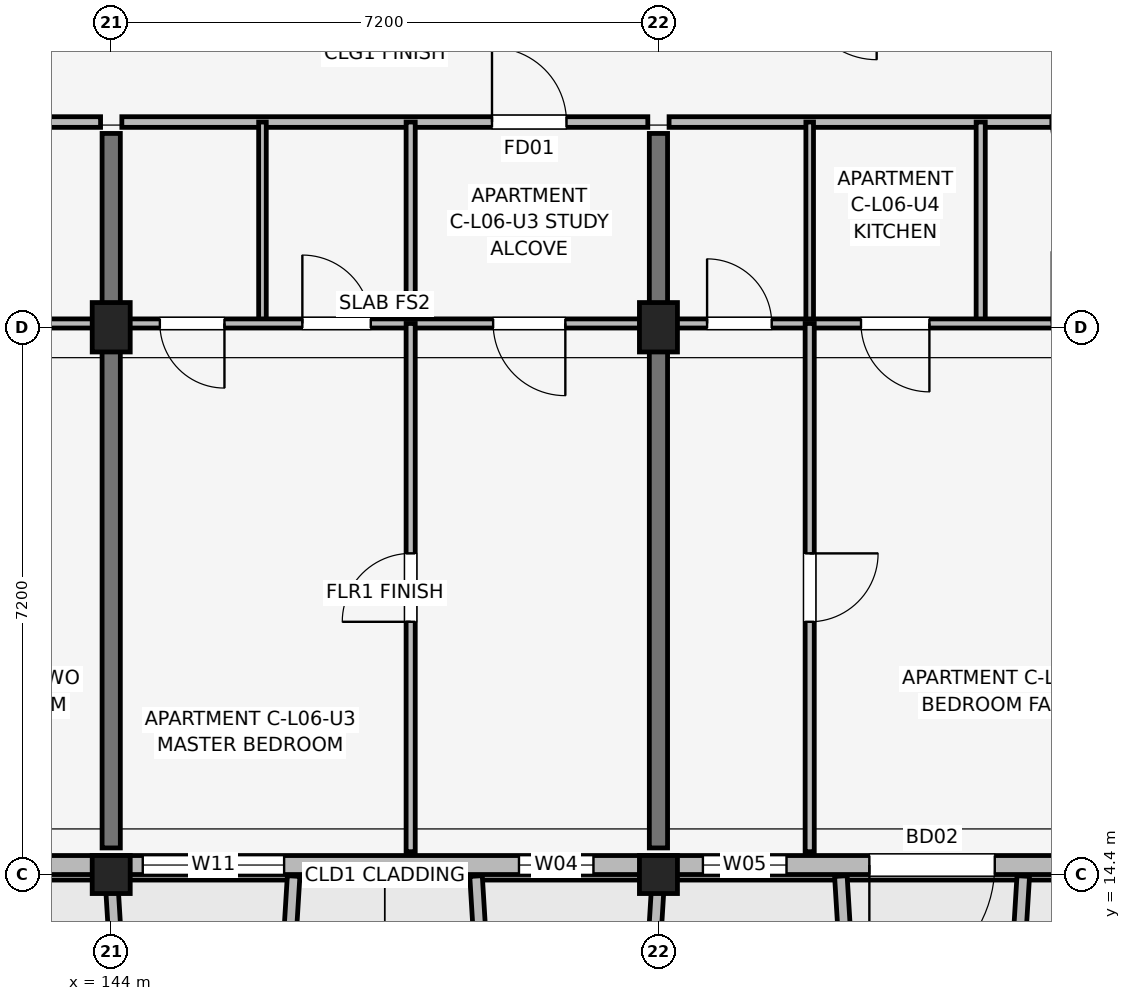
"""IFC4 building model, lengths in metres.
Left out: names, types, materials, properties, quantities, classifications, styles, units other than length and angle.
Written with IfcOpenShell. Run it as: python <this file> out.ifc"""

import sys

from ifc_helpers import new_model, si_unit, direction, frame, frame_2d, origin, origin_2d, place, context, subcontext, project, spatial, rectangle, extrude, element, fill, save


model = new_model("IFC4")
c1 = context("Model", 3, precision=1e-05, world=origin(), true_north=direction((0.0, 1.0)))
c2 = subcontext(c1, "Body", "Model", "MODEL_VIEW")
j1 = project(units=[si_unit("LENGTHUNIT", "METRE"), si_unit("PLANEANGLEUNIT", "RADIAN")], contexts=[c1])
p1 = place(None, origin())
s1 = spatial("IfcSite", under=j1, at=p1, CompositionType="ELEMENT")
p2 = place(p1, origin())
s2 = spatial("IfcBuilding", under=s1, at=p2, CompositionType="ELEMENT")
p3 = place(p2, frame((0.0, 0.0, 21.3)))
s3 = spatial("IfcBuildingStorey", under=s2, at=p3, CompositionType="ELEMENT", Elevation=21.3)
p4 = place(p3, frame((144.0, 14.4, 0.0), z_axis=(0.0, 0.0, 1.0), x_axis=(1.0, 0.0, 0.0)))
e1 = element("IfcColumn", 1, at=p4, inside=s3, PredefinedType="COLUMN", context=c2, shape_type="SweptSolid", body=[
    extrude(rectangle(XDim=0.5, YDim=0.5, at=origin_2d()), origin(), (0.0, 0.0, 1.0), 3.15),
])
p5 = place(p3, frame((144.0, 21.6, 0.0), z_axis=(0.0, 0.0, 1.0), x_axis=(1.0, 0.0, 0.0)))
e2 = element("IfcColumn", 2, at=p5, inside=s3, PredefinedType="COLUMN", context=c2, shape_type="SweptSolid", body=[
    extrude(rectangle(XDim=0.5, YDim=0.65, at=origin_2d()), origin(), (0.0, 0.0, 1.0), 3.15),
])
p6 = place(p3, frame((151.2, 14.4, 0.0), z_axis=(0.0, 0.0, 1.0), x_axis=(1.0, 0.0, 0.0)))
e3 = element("IfcColumn", 3, at=p6, inside=s3, PredefinedType="COLUMN", context=c2, shape_type="SweptSolid", body=[
    extrude(rectangle(XDim=0.5, YDim=0.5, at=origin_2d()), origin(), (0.0, 0.0, 1.0), 3.15),
])
p7 = place(p3, frame((151.2, 21.6, 0.0), z_axis=(0.0, 0.0, 1.0), x_axis=(1.0, 0.0, 0.0)))
e4 = element("IfcColumn", 4, at=p7, inside=s3, PredefinedType="COLUMN", context=c2, shape_type="SweptSolid", body=[
    extrude(rectangle(XDim=0.5, YDim=0.65, at=origin_2d()), origin(), (0.0, 0.0, 1.0), 3.15),
])
for number, where, z_axis, x_axis in (
    (5, (144.0, 14.75, 0.0), (0.0, 0.0, 1.0), (0.0, 1.0, 0.0)),
    (6, (151.2, 14.75, 0.0), (0.0, 0.0, 1.0), (0.0, 1.0, 0.0)),
):
    element("IfcWall", number, at=place(p3, frame(where, z_axis=z_axis, x_axis=x_axis)), inside=s3, PredefinedType="SHEAR", context=c2, shape_type="SweptSolid", body=[
        extrude(rectangle(XDim=9.4, YDim=0.24, at=frame_2d((4.7, 0.0))), origin(), (0.0, 0.0, 1.0), 3.15),
    ])
p8 = place(p3, frame((132.6, 14.525, 0.0), z_axis=(0.0, 0.0, 1.0), x_axis=(1.0, 0.0, 0.0)))
e7 = element("IfcWall", 7, at=p8, inside=s3, PredefinedType="SOLIDWALL", context=c2, shape_type="SweptSolid", body=[
    extrude(rectangle(XDim=30.0, YDim=0.25, at=frame_2d((15.0, 0.0))), origin(), (0.0, 0.0, 1.0), 2.43),
])
p9 = place(p8, frame((8.7, 0.0, 0.0), z_axis=(0.0, 0.0, 1.0), x_axis=(-1.0, 0.0, 0.0)))
e8 = element("IfcOpeningElement", 8, at=p9, cuts=e7, PredefinedType="OPENING", context=c2, shape_type="SweptSolid", body=[
    extrude(rectangle(XDim=1.8, YDim=2.15, at=frame_2d((0.9, 1.075))), frame((0.0, 0.135, 0.0), z_axis=(0.0, -1.0, 0.0), x_axis=(1.0, 0.0, 0.0)), (0.0, 0.0, 1.0), 0.27),
])
p10 = place(p8, frame((23.025, 0.0, 0.0), z_axis=(0.0, 0.0, 1.0), x_axis=(-1.0, 0.0, 0.0)))
e9 = element("IfcOpeningElement", 9, at=p10, cuts=e7, PredefinedType="OPENING", context=c2, shape_type="SweptSolid", body=[
    extrude(rectangle(XDim=1.65, YDim=2.15, at=frame_2d((0.825, 1.075))), frame((0.0, 0.135, 0.0), z_axis=(0.0, -1.0, 0.0), x_axis=(1.0, 0.0, 0.0)), (0.0, 0.0, 1.0), 0.27),
])
p11 = place(p8, frame((1.995, 0.0, 0.7)))
e10 = element("IfcOpeningElement", 10, at=p11, cuts=e7, PredefinedType="OPENING", context=c2, shape_type="SweptSolid", body=[
    extrude(rectangle(XDim=1.72, YDim=1.6, at=frame_2d((0.86, 0.8))), frame((0.0, 0.135, 0.0), z_axis=(0.0, -1.0, 0.0), x_axis=(1.0, 0.0, 0.0)), (0.0, 0.0, 1.0), 0.27),
])
p12 = place(p8, frame((4.975, 0.0, 0.75)))
e11 = element("IfcOpeningElement", 11, at=p12, cuts=e7, PredefinedType="OPENING", context=c2, shape_type="SweptSolid", body=[
    extrude(rectangle(XDim=0.72, YDim=1.35, at=frame_2d((0.36, 0.675))), frame((0.0, 0.135, 0.0), z_axis=(0.0, -1.0, 0.0), x_axis=(1.0, 0.0, 0.0)), (0.0, 0.0, 1.0), 0.27),
])
p13 = place(p8, frame((11.815, 0.0, 0.7)))
e12 = element("IfcOpeningElement", 12, at=p13, cuts=e7, PredefinedType="OPENING", context=c2, shape_type="SweptSolid", body=[
    extrude(rectangle(XDim=1.86, YDim=1.6, at=frame_2d((0.93, 0.8))), frame((0.0, 0.135, 0.0), z_axis=(0.0, -1.0, 0.0), x_axis=(1.0, 0.0, 0.0)), (0.0, 0.0, 1.0), 0.27),
])
p14 = place(p8, frame((16.765, 0.0, 0.75)))
e13 = element("IfcOpeningElement", 13, at=p14, cuts=e7, PredefinedType="OPENING", context=c2, shape_type="SweptSolid", body=[
    extrude(rectangle(XDim=0.98, YDim=1.45, at=frame_2d((0.49, 0.725))), frame((0.0, 0.135, 0.0), z_axis=(0.0, -1.0, 0.0), x_axis=(1.0, 0.0, 0.0)), (0.0, 0.0, 1.0), 0.27),
])
p15 = place(p8, frame((19.185, 0.0, 0.75)))
e14 = element("IfcOpeningElement", 14, at=p15, cuts=e7, PredefinedType="OPENING", context=c2, shape_type="SweptSolid", body=[
    extrude(rectangle(XDim=1.1, YDim=1.5, at=frame_2d((0.55, 0.75))), frame((0.0, 0.135, 0.0), z_axis=(0.0, -1.0, 0.0), x_axis=(1.0, 0.0, 0.0)), (0.0, 0.0, 1.0), 0.27),
])
p16 = place(p8, frame((26.325, 0.0, 0.75)))
e15 = element("IfcOpeningElement", 15, at=p16, cuts=e7, PredefinedType="OPENING", context=c2, shape_type="SweptSolid", body=[
    extrude(rectangle(XDim=1.22, YDim=1.5, at=frame_2d((0.61, 0.75))), frame((0.0, 0.135, 0.0), z_axis=(0.0, -1.0, 0.0), x_axis=(1.0, 0.0, 0.0)), (0.0, 0.0, 1.0), 0.27),
])
p17 = place(p3, frame((144.0, 14.38, 0.0), z_axis=(0.0, 0.0, 1.0), x_axis=(0.061170732449, -0.998127317276, 0.0)))
e16 = element("IfcWall", 16, at=p17, inside=s3, PredefinedType="ELEMENTEDWALL", context=c2, shape_type="SweptSolid", body=[
    extrude(rectangle(XDim=1.964, YDim=0.165, at=frame_2d((0.982, 0.0))), origin(), (0.0, 0.0, 1.0), 2.95),
])
for number, where, z_axis, x_axis in (
    (17, (146.4, 14.38, 0.0), (0.0, 0.0, 1.0), (-0.061, -0.998, 0.0)),
    (18, (148.8, 14.38, 0.0), (0.0, 0.0, 1.0), (0.061, -0.998, 0.0)),
):
    element("IfcWall", number, at=place(p3, frame(where, z_axis=z_axis, x_axis=x_axis)), inside=s3, PredefinedType="ELEMENTEDWALL", context=c2, shape_type="SweptSolid", body=[
        extrude(rectangle(XDim=1.964, YDim=0.165, at=frame_2d((0.982, 0.0))), origin(), (0.0, 0.0, 1.0), 2.53),
    ])
p18 = place(p3, frame((151.2, 14.38, 0.0), z_axis=(0.0, 0.0, 1.0), x_axis=(-0.061046865508, -0.998134900808, 0.0)))
e19 = element("IfcWall", 19, at=p18, inside=s3, PredefinedType="ELEMENTEDWALL", context=c2, shape_type="SweptSolid", body=[
    extrude(rectangle(XDim=1.964, YDim=0.165, at=frame_2d((0.982, 0.0))), origin(), (0.0, 0.0, 1.0), 2.95),
])
for number, where, z_axis, x_axis in (
    (20, (153.6, 14.38, 0.0), (0.0, 0.0, 1.0), (0.061, -0.998, 0.0)),
    (21, (156.0, 14.38, 0.0), (0.0, 0.0, 1.0), (-0.061, -0.998, 0.0)),
):
    element("IfcWall", number, at=place(p3, frame(where, z_axis=z_axis, x_axis=x_axis)), inside=s3, PredefinedType="ELEMENTEDWALL", context=c2, shape_type="SweptSolid", body=[
        extrude(rectangle(XDim=1.964, YDim=0.165, at=frame_2d((0.982, 0.0))), origin(), (0.0, 0.0, 1.0), 2.48),
    ])
p19 = place(p3, frame((136.94, 24.3, 0.0), z_axis=(0.0, 0.0, 1.0), x_axis=(1.0, 0.0, 0.0)))
e22 = element("IfcWall", 22, at=p19, inside=s3, PredefinedType="PARTITIONING", context=c2, shape_type="SweptSolid", body=[
    extrude(rectangle(XDim=6.92, YDim=0.14, at=frame_2d((3.46, 0.0))), origin(), (0.0, 0.0, 1.0), 2.38),
])
p20 = place(p19, frame((6.0, 0.0, 0.0), z_axis=(0.0, 0.0, 1.0), x_axis=(-1.0, 0.0, 0.0)))
e23 = element("IfcOpeningElement", 23, at=p20, cuts=e22, PredefinedType="OPENING", context=c2, shape_type="SweptSolid", body=[
    extrude(rectangle(XDim=0.98, YDim=2.1, at=frame_2d((0.49, 1.05))), frame((0.0, 0.08, 0.0), z_axis=(0.0, -1.0, 0.0), x_axis=(1.0, 0.0, 0.0)), (0.0, 0.0, 1.0), 0.16),
])
p21 = place(p3, frame((136.94, 21.65, 0.0), z_axis=(0.0, 0.0, 1.0), x_axis=(1.0, 0.0, 0.0)))
e24 = element("IfcWall", 24, at=p21, inside=s3, PredefinedType="PARTITIONING", context=c2, shape_type="SweptSolid", body=[
    extrude(rectangle(XDim=6.92, YDim=0.12, at=frame_2d((3.46, 0.0))), origin(), (0.0, 0.0, 1.0), 2.38),
])
p22 = place(p21, frame((0.5, 0.0, 0.0)))
e25 = element("IfcOpeningElement", 25, at=p22, cuts=e24, PredefinedType="OPENING", context=c2, shape_type="SweptSolid", body=[
    extrude(rectangle(XDim=0.85, YDim=2.08, at=frame_2d((0.425, 1.04))), frame((0.0, 0.07, 0.0), z_axis=(0.0, -1.0, 0.0), x_axis=(1.0, 0.0, 0.0)), (0.0, 0.0, 1.0), 0.14),
])
p23 = place(p21, frame((3.425, 0.0, 0.0), z_axis=(0.0, 0.0, 1.0), x_axis=(-1.0, 0.0, 0.0)))
e26 = element("IfcOpeningElement", 26, at=p23, cuts=e24, PredefinedType="OPENING", context=c2, shape_type="SweptSolid", body=[
    extrude(rectangle(XDim=0.9, YDim=2.08, at=frame_2d((0.45, 1.04))), frame((0.0, 0.07, 0.0), z_axis=(0.0, -1.0, 0.0), x_axis=(1.0, 0.0, 0.0)), (0.0, 0.0, 1.0), 0.14),
])
p24 = place(p21, frame((5.035, 0.0, 0.0)))
e27 = element("IfcOpeningElement", 27, at=p24, cuts=e24, PredefinedType="OPENING", context=c2, shape_type="SweptSolid", body=[
    extrude(rectangle(XDim=0.95, YDim=2.08, at=frame_2d((0.475, 1.04))), frame((0.0, 0.07, 0.0), z_axis=(0.0, -1.0, 0.0), x_axis=(1.0, 0.0, 0.0)), (0.0, 0.0, 1.0), 0.14),
])
p25 = place(p3, frame((144.14, 24.3, 0.0), z_axis=(0.0, 0.0, 1.0), x_axis=(1.0, 0.0, 0.0)))
e28 = element("IfcWall", 28, at=p25, inside=s3, PredefinedType="PARTITIONING", context=c2, shape_type="SweptSolid", body=[
    extrude(rectangle(XDim=6.92, YDim=0.14, at=frame_2d((3.46, 0.0))), origin(), (0.0, 0.0, 1.0), 2.38),
])
p26 = place(p25, frame((4.87, 0.0, 0.0)))
e29 = element("IfcOpeningElement", 29, at=p26, cuts=e28, PredefinedType="OPENING", context=c2, shape_type="SweptSolid", body=[
    extrude(rectangle(XDim=0.98, YDim=2.1, at=frame_2d((0.49, 1.05))), frame((0.0, 0.08, 0.0), z_axis=(0.0, -1.0, 0.0), x_axis=(1.0, 0.0, 0.0)), (0.0, 0.0, 1.0), 0.16),
])
p27 = place(p3, frame((145.99, 21.65, 0.0), z_axis=(0.0, 0.0, 1.0), x_axis=(0.0, 1.0, 0.0)))
e30 = element("IfcWall", 30, at=p27, inside=s3, PredefinedType="PARTITIONING", context=c2, shape_type="SweptSolid", body=[
    extrude(rectangle(XDim=2.65, YDim=0.1, at=frame_2d((1.325, 0.0))), origin(), (0.0, 0.0, 1.0), 2.38),
])
p28 = place(p3, frame((147.94, 21.65, 0.0), z_axis=(0.0, 0.0, 1.0), x_axis=(0.0, 1.0, 0.0)))
e31 = element("IfcWall", 31, at=p28, inside=s3, PredefinedType="PARTITIONING", context=c2, shape_type="SweptSolid", body=[
    extrude(rectangle(XDim=2.65, YDim=0.12, at=frame_2d((1.325, 0.0))), origin(), (0.0, 0.0, 1.0), 2.38),
])
p29 = place(p3, frame((144.14, 21.65, 0.0), z_axis=(0.0, 0.0, 1.0), x_axis=(1.0, 0.0, 0.0)))
e32 = element("IfcWall", 32, at=p29, inside=s3, PredefinedType="PARTITIONING", context=c2, shape_type="SweptSolid", body=[
    extrude(rectangle(XDim=6.92, YDim=0.12, at=frame_2d((3.46, 0.0))), origin(), (0.0, 0.0, 1.0), 2.38),
])
p30 = place(p29, frame((1.35, 0.0, 0.0), z_axis=(0.0, 0.0, 1.0), x_axis=(-1.0, 0.0, 0.0)))
e33 = element("IfcOpeningElement", 33, at=p30, cuts=e32, PredefinedType="OPENING", context=c2, shape_type="SweptSolid", body=[
    extrude(rectangle(XDim=0.85, YDim=2.08, at=frame_2d((0.425, 1.04))), frame((0.0, 0.07, 0.0), z_axis=(0.0, -1.0, 0.0), x_axis=(1.0, 0.0, 0.0)), (0.0, 0.0, 1.0), 0.14),
])
p31 = place(p29, frame((2.375, 0.0, 0.0)))
e34 = element("IfcOpeningElement", 34, at=p31, cuts=e32, PredefinedType="OPENING", context=c2, shape_type="SweptSolid", body=[
    extrude(rectangle(XDim=0.9, YDim=2.08, at=frame_2d((0.45, 1.04))), frame((0.0, 0.07, 0.0), z_axis=(0.0, -1.0, 0.0), x_axis=(1.0, 0.0, 0.0)), (0.0, 0.0, 1.0), 0.14),
])
p32 = place(p29, frame((5.835, 0.0, 0.0), z_axis=(0.0, 0.0, 1.0), x_axis=(-1.0, 0.0, 0.0)))
e35 = element("IfcOpeningElement", 35, at=p32, cuts=e32, PredefinedType="OPENING", context=c2, shape_type="SweptSolid", body=[
    extrude(rectangle(XDim=0.95, YDim=2.08, at=frame_2d((0.475, 1.04))), frame((0.0, 0.07, 0.0), z_axis=(0.0, -1.0, 0.0), x_axis=(1.0, 0.0, 0.0)), (0.0, 0.0, 1.0), 0.14),
])
p33 = place(p3, frame((147.94, 14.7, 0.0), z_axis=(0.0, 0.0, 1.0), x_axis=(0.0, 1.0, 0.0)))
e36 = element("IfcWall", 36, at=p33, inside=s3, PredefinedType="PARTITIONING", context=c2, shape_type="SweptSolid", body=[
    extrude(rectangle(XDim=6.95, YDim=0.12, at=frame_2d((3.475, 0.0))), origin(), (0.0, 0.0, 1.0), 2.38),
])
p34 = place(p33, frame((3.025, 0.0, 0.0)))
e37 = element("IfcOpeningElement", 37, at=p34, cuts=e36, PredefinedType="OPENING", context=c2, shape_type="SweptSolid", body=[
    extrude(rectangle(XDim=0.9, YDim=2.08, at=frame_2d((0.45, 1.04))), frame((0.0, 0.07, 0.0), z_axis=(0.0, -1.0, 0.0), x_axis=(1.0, 0.0, 0.0)), (0.0, 0.0, 1.0), 0.14),
])
p35 = place(p3, frame((151.34, 24.3, 0.0), z_axis=(0.0, 0.0, 1.0), x_axis=(1.0, 0.0, 0.0)))
e38 = element("IfcWall", 38, at=p35, inside=s3, PredefinedType="PARTITIONING", context=c2, shape_type="SweptSolid", body=[
    extrude(rectangle(XDim=6.92, YDim=0.14, at=frame_2d((3.46, 0.0))), origin(), (0.0, 0.0, 1.0), 2.38),
])
p36 = place(p35, frame((6.0, 0.0, 0.0), z_axis=(0.0, 0.0, 1.0), x_axis=(-1.0, 0.0, 0.0)))
e39 = element("IfcOpeningElement", 39, at=p36, cuts=e38, PredefinedType="OPENING", context=c2, shape_type="SweptSolid", body=[
    extrude(rectangle(XDim=0.98, YDim=2.1, at=frame_2d((0.49, 1.05))), frame((0.0, 0.08, 0.0), z_axis=(0.0, -1.0, 0.0), x_axis=(1.0, 0.0, 0.0)), (0.0, 0.0, 1.0), 0.16),
])
p37 = place(p3, frame((153.19, 21.65, 0.0), z_axis=(0.0, 0.0, 1.0), x_axis=(0.0, 1.0, 0.0)))
e40 = element("IfcWall", 40, at=p37, inside=s3, PredefinedType="PARTITIONING", context=c2, shape_type="SweptSolid", body=[
    extrude(rectangle(XDim=2.65, YDim=0.1, at=frame_2d((1.325, 0.0))), origin(), (0.0, 0.0, 1.0), 2.38),
])
p38 = place(p3, frame((155.44, 21.65, 0.0), z_axis=(0.0, 0.0, 1.0), x_axis=(0.0, 1.0, 0.0)))
e41 = element("IfcWall", 41, at=p38, inside=s3, PredefinedType="PARTITIONING", context=c2, shape_type="SweptSolid", body=[
    extrude(rectangle(XDim=2.65, YDim=0.12, at=frame_2d((1.325, 0.0))), origin(), (0.0, 0.0, 1.0), 2.38),
])
p39 = place(p3, frame((151.34, 21.65, 0.0), z_axis=(0.0, 0.0, 1.0), x_axis=(1.0, 0.0, 0.0)))
e42 = element("IfcWall", 42, at=p39, inside=s3, PredefinedType="PARTITIONING", context=c2, shape_type="SweptSolid", body=[
    extrude(rectangle(XDim=6.92, YDim=0.12, at=frame_2d((3.46, 0.0))), origin(), (0.0, 0.0, 1.0), 2.38),
])
p40 = place(p39, frame((0.5, 0.0, 0.0)))
e43 = element("IfcOpeningElement", 43, at=p40, cuts=e42, PredefinedType="OPENING", context=c2, shape_type="SweptSolid", body=[
    extrude(rectangle(XDim=0.85, YDim=2.08, at=frame_2d((0.425, 1.04))), frame((0.0, 0.07, 0.0), z_axis=(0.0, -1.0, 0.0), x_axis=(1.0, 0.0, 0.0)), (0.0, 0.0, 1.0), 0.14),
])
p41 = place(p39, frame((3.425, 0.0, 0.0), z_axis=(0.0, 0.0, 1.0), x_axis=(-1.0, 0.0, 0.0)))
e44 = element("IfcOpeningElement", 44, at=p41, cuts=e42, PredefinedType="OPENING", context=c2, shape_type="SweptSolid", body=[
    extrude(rectangle(XDim=0.9, YDim=2.08, at=frame_2d((0.45, 1.04))), frame((0.0, 0.07, 0.0), z_axis=(0.0, -1.0, 0.0), x_axis=(1.0, 0.0, 0.0)), (0.0, 0.0, 1.0), 0.14),
])
p42 = place(p39, frame((5.035, 0.0, 0.0)))
e45 = element("IfcOpeningElement", 45, at=p42, cuts=e42, PredefinedType="OPENING", context=c2, shape_type="SweptSolid", body=[
    extrude(rectangle(XDim=0.95, YDim=2.08, at=frame_2d((0.475, 1.04))), frame((0.0, 0.07, 0.0), z_axis=(0.0, -1.0, 0.0), x_axis=(1.0, 0.0, 0.0)), (0.0, 0.0, 1.0), 0.14),
])
p43 = place(p3, frame((153.19, 14.7, 0.0), z_axis=(0.0, 0.0, 1.0), x_axis=(0.0, 1.0, 0.0)))
e46 = element("IfcWall", 46, at=p43, inside=s3, PredefinedType="PARTITIONING", context=c2, shape_type="SweptSolid", body=[
    extrude(rectangle(XDim=6.95, YDim=0.12, at=frame_2d((3.475, 0.0))), origin(), (0.0, 0.0, 1.0), 2.38),
])
p44 = place(p43, frame((3.925, 0.0, 0.0), z_axis=(0.0, 0.0, 1.0), x_axis=(-1.0, 0.0, 0.0)))
e47 = element("IfcOpeningElement", 47, at=p44, cuts=e46, PredefinedType="OPENING", context=c2, shape_type="SweptSolid", body=[
    extrude(rectangle(XDim=0.9, YDim=2.08, at=frame_2d((0.45, 1.04))), frame((0.0, 0.07, 0.0), z_axis=(0.0, -1.0, 0.0), x_axis=(1.0, 0.0, 0.0)), (0.0, 0.0, 1.0), 0.14),
])
p45 = place(p10, origin())
e48 = element("IfcDoor", 48, at=p45, inside=s3, OperationType="SINGLE_SWING_LEFT", PredefinedType="DOOR", context=c2, shape_type="SweptSolid", body=[
    extrude(rectangle(XDim=1.65, YDim=2.15, at=frame_2d((0.825, 1.075))), frame((0.0, 0.025, 0.0), z_axis=(0.0, -1.0, 0.0), x_axis=(1.0, 0.0, 0.0)), (0.0, 0.0, 1.0), 0.05),
])
fill(e9, e48)
p46 = place(p13, origin())
e49 = element("IfcWindow", 49, at=p46, inside=s3, PartitioningType="SINGLE_PANEL", PredefinedType="WINDOW", context=c2, shape_type="SweptSolid", body=[
    extrude(rectangle(XDim=1.86, YDim=1.6, at=frame_2d((0.93, 0.8))), frame((0.0, 0.03, 0.0), z_axis=(0.0, -1.0, 0.0), x_axis=(1.0, 0.0, 0.0)), (0.0, 0.0, 1.0), 0.06),
])
fill(e12, e49)
p47 = place(p14, origin())
e50 = element("IfcWindow", 50, at=p47, inside=s3, PartitioningType="SINGLE_PANEL", PredefinedType="WINDOW", context=c2, shape_type="SweptSolid", body=[
    extrude(rectangle(XDim=0.98, YDim=1.45, at=frame_2d((0.49, 0.725))), frame((0.0, 0.03, 0.0), z_axis=(0.0, -1.0, 0.0), x_axis=(1.0, 0.0, 0.0)), (0.0, 0.0, 1.0), 0.06),
])
fill(e13, e50)
p48 = place(p15, origin())
e51 = element("IfcWindow", 51, at=p48, inside=s3, PartitioningType="SINGLE_PANEL", PredefinedType="WINDOW", context=c2, shape_type="SweptSolid", body=[
    extrude(rectangle(XDim=1.1, YDim=1.5, at=frame_2d((0.55, 0.75))), frame((0.0, 0.03, 0.0), z_axis=(0.0, -1.0, 0.0), x_axis=(1.0, 0.0, 0.0)), (0.0, 0.0, 1.0), 0.06),
])
fill(e14, e51)
p49 = place(p26, origin())
e52 = element("IfcDoor", 52, at=p49, inside=s3, OperationType="SINGLE_SWING_LEFT", PredefinedType="DOOR", context=c2, shape_type="SweptSolid", body=[
    extrude(rectangle(XDim=0.98, YDim=2.1, at=frame_2d((0.49, 1.05))), frame((0.0, 0.025, 0.0), z_axis=(0.0, -1.0, 0.0), x_axis=(1.0, 0.0, 0.0)), (0.0, 0.0, 1.0), 0.05),
])
fill(e29, e52)
p50 = place(p30, origin())
e53 = element("IfcDoor", 53, at=p50, inside=s3, OperationType="SINGLE_SWING_RIGHT", PredefinedType="DOOR", context=c2, shape_type="SweptSolid", body=[
    extrude(rectangle(XDim=0.85, YDim=2.08, at=frame_2d((0.425, 1.04))), frame((0.0, 0.025, 0.0), z_axis=(0.0, -1.0, 0.0), x_axis=(1.0, 0.0, 0.0)), (0.0, 0.0, 1.0), 0.05),
])
fill(e33, e53)
p51 = place(p31, origin())
e54 = element("IfcDoor", 54, at=p51, inside=s3, OperationType="SINGLE_SWING_LEFT", PredefinedType="DOOR", context=c2, shape_type="SweptSolid", body=[
    extrude(rectangle(XDim=0.9, YDim=2.08, at=frame_2d((0.45, 1.04))), frame((0.0, 0.025, 0.0), z_axis=(0.0, -1.0, 0.0), x_axis=(1.0, 0.0, 0.0)), (0.0, 0.0, 1.0), 0.05),
])
fill(e34, e54)
p52 = place(p32, origin())
e55 = element("IfcDoor", 55, at=p52, inside=s3, OperationType="SINGLE_SWING_RIGHT", PredefinedType="DOOR", context=c2, shape_type="SweptSolid", body=[
    extrude(rectangle(XDim=0.95, YDim=2.08, at=frame_2d((0.475, 1.04))), frame((0.0, 0.025, 0.0), z_axis=(0.0, -1.0, 0.0), x_axis=(1.0, 0.0, 0.0)), (0.0, 0.0, 1.0), 0.05),
])
fill(e35, e55)
p53 = place(p34, origin())
e56 = element("IfcDoor", 56, at=p53, inside=s3, OperationType="SINGLE_SWING_LEFT", PredefinedType="DOOR", context=c2, shape_type="SweptSolid", body=[
    extrude(rectangle(XDim=0.9, YDim=2.08, at=frame_2d((0.45, 1.04))), frame((0.0, 0.025, 0.0), z_axis=(0.0, -1.0, 0.0), x_axis=(1.0, 0.0, 0.0)), (0.0, 0.0, 1.0), 0.05),
])
fill(e37, e56)
p54 = place(p40, origin())
e57 = element("IfcDoor", 57, at=p54, inside=s3, OperationType="SINGLE_SWING_LEFT", PredefinedType="DOOR", context=c2, shape_type="SweptSolid", body=[
    extrude(rectangle(XDim=0.85, YDim=2.08, at=frame_2d((0.425, 1.04))), frame((0.0, 0.025, 0.0), z_axis=(0.0, -1.0, 0.0), x_axis=(1.0, 0.0, 0.0)), (0.0, 0.0, 1.0), 0.05),
])
fill(e43, e57)
p55 = place(p41, origin())
e58 = element("IfcDoor", 58, at=p55, inside=s3, OperationType="SINGLE_SWING_RIGHT", PredefinedType="DOOR", context=c2, shape_type="SweptSolid", body=[
    extrude(rectangle(XDim=0.9, YDim=2.08, at=frame_2d((0.45, 1.04))), frame((0.0, 0.025, 0.0), z_axis=(0.0, -1.0, 0.0), x_axis=(1.0, 0.0, 0.0)), (0.0, 0.0, 1.0), 0.05),
])
fill(e44, e58)
p56 = place(p44, origin())
e59 = element("IfcDoor", 59, at=p56, inside=s3, OperationType="SINGLE_SWING_RIGHT", PredefinedType="DOOR", context=c2, shape_type="SweptSolid", body=[
    extrude(rectangle(XDim=0.9, YDim=2.08, at=frame_2d((0.45, 1.04))), frame((0.0, 0.025, 0.0), z_axis=(0.0, -1.0, 0.0), x_axis=(1.0, 0.0, 0.0)), (0.0, 0.0, 1.0), 0.05),
])
fill(e47, e59)
save(model, sys.argv[1])
